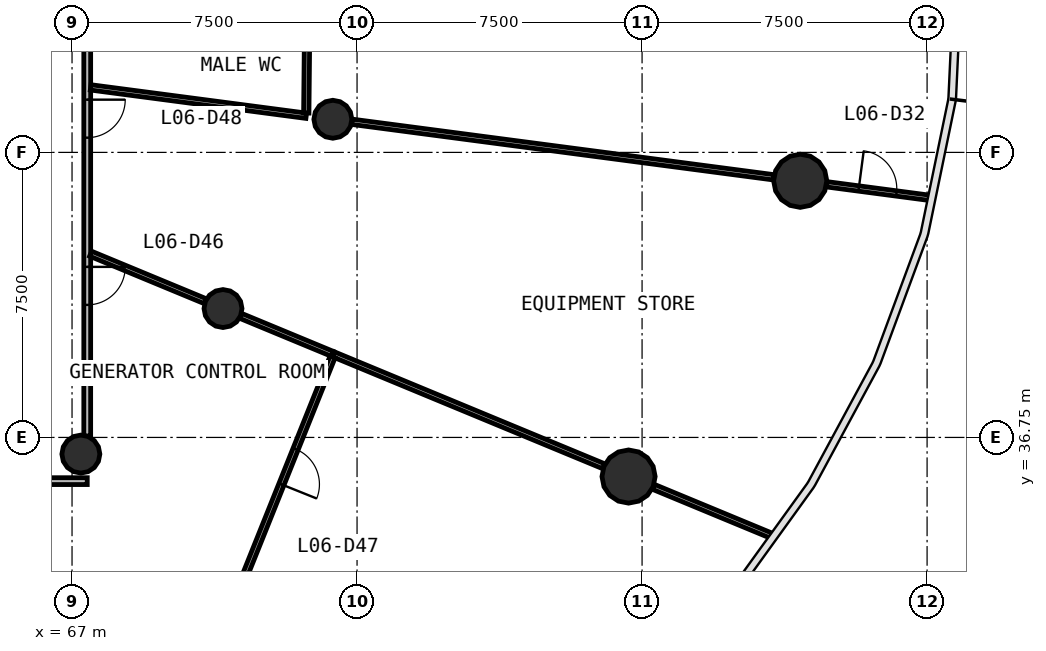
"""IFC4 building model, lengths in metres.
Left out: names, types, materials, properties, quantities, classifications, styles, units other than length and angle.
Written with IfcOpenShell. Run it as: python <this file> out.ifc"""

import sys

from ifc_helpers import new_model, si_unit, direction, frame, frame_2d, origin, origin_2d, place, context, subcontext, project, spatial, rectangle, circle, extrude, source, transform, mapped, element, fill, save


model = new_model("IFC4")
c1 = context("Model", 3, precision=1e-05, world=origin(), true_north=direction((0.0, 1.0)))
c2 = subcontext(c1, "Body", "Model", "MODEL_VIEW")
j1 = project(units=[si_unit("LENGTHUNIT", "METRE"), si_unit("PLANEANGLEUNIT", "RADIAN")], contexts=[c1])
p1 = place(None, origin())
s1 = spatial("IfcSite", under=j1, at=p1, CompositionType="ELEMENT")
p2 = place(p1, origin())
s2 = spatial("IfcBuilding", under=s1, at=p2, CompositionType="ELEMENT")
p3 = place(p2, frame((0.0, 0.0, 27.0)))
s3 = spatial("IfcBuildingStorey", under=s2, at=p3, CompositionType="ELEMENT", Elevation=27.0)
m1 = source(origin(), c2, "Body", "SweptSolid", [
    extrude(circle(Radius=0.7, at=origin_2d()), origin(), (0.0, 0.0, 1.0), 4.4),
])
for number, where, z_axis, x_axis in (
    (1, (81.645, 35.721, 0.0), (0.0, 0.0, 1.0), (1.0, 0.0, 0.0)),
    (2, (86.161, 43.503, 0.0), (0.0, 0.0, 1.0), (1.0, 0.0, 0.0)),
):
    element("IfcColumn", number, at=place(p3, frame(where, z_axis=z_axis, x_axis=x_axis)), inside=s3, PredefinedType="COLUMN", context=c2, shape_type="MappedRepresentation", body=[
        mapped(m1, transform((0.0, 0.0, 0.0), scale=1.0)),
    ])
m2 = source(origin(), c2, "Body", "SweptSolid", [
    extrude(circle(Radius=0.5, at=origin_2d()), origin(), (0.0, 0.0, 1.0), 4.4),
])
for number, where, z_axis, x_axis in (
    (3, (67.232, 36.312, 0.0), (0.0, 0.0, 1.0), (1.0, 0.0, 0.0)),
    (4, (70.972, 40.141, 0.0), (0.0, 0.0, 1.0), (1.0, 0.0, 0.0)),
    (5, (73.863, 45.122, 0.0), (0.0, 0.0, 1.0), (1.0, 0.0, 0.0)),
):
    element("IfcColumn", number, at=place(p3, frame(where, z_axis=z_axis, x_axis=x_axis)), inside=s3, PredefinedType="COLUMN", context=c2, shape_type="MappedRepresentation", body=[
        mapped(m2, transform((0.0, 0.0, 0.0), scale=1.0)),
    ])
p4 = place(p3, frame((67.4, 35.6, 0.0), z_axis=(0.0, 0.0, 1.0), x_axis=(-1.0, 0.0, 0.0)))
e6 = element("IfcWall", 6, at=p4, inside=s3, PredefinedType="PARTITIONING", context=c2, shape_type="SweptSolid", body=[
    extrude(rectangle(XDim=30.8, YDim=0.18, at=frame_2d((15.4, 0.0))), origin(), (0.0, 0.0, 1.0), 3.05),
])
p5 = place(p4, frame((17.35, 0.0, 0.0)))
e7 = element("IfcOpeningElement", 7, at=p5, cuts=e6, PredefinedType="OPENING", context=c2, shape_type="SweptSolid", body=[
    extrude(rectangle(XDim=1.0, YDim=2.1, at=frame_2d((0.5, 1.05))), frame((0.0, 0.1, 0.0), z_axis=(0.0, -1.0, 0.0), x_axis=(1.0, 0.0, 0.0)), (0.0, 0.0, 1.0), 0.2),
])
p6 = place(p4, frame((14.95, 0.0, 0.0)))
e8 = element("IfcOpeningElement", 8, at=p6, cuts=e6, PredefinedType="OPENING", context=c2, shape_type="SweptSolid", body=[
    extrude(rectangle(XDim=1.0, YDim=2.1, at=frame_2d((0.5, 1.05))), frame((0.0, 0.1, 0.0), z_axis=(0.0, -1.0, 0.0), x_axis=(1.0, 0.0, 0.0)), (0.0, 0.0, 1.0), 0.2),
])
p7 = place(p3, frame((67.4, 60.37, 0.0), z_axis=(0.0, 0.0, 1.0), x_axis=(0.0, -1.0, 0.0)))
e9 = element("IfcWall", 9, at=p7, inside=s3, PredefinedType="PARTITIONING", context=c2, shape_type="SweptSolid", body=[
    extrude(rectangle(XDim=23.583, YDim=0.18, at=frame_2d((11.791, 0.0))), origin(), (0.0, 0.0, 1.0), 3.05),
])
p8 = place(p7, frame((11.833, 0.0, 0.0)))
e10 = element("IfcOpeningElement", 10, at=p8, cuts=e9, PredefinedType="OPENING", context=c2, shape_type="SweptSolid", body=[
    extrude(rectangle(XDim=0.9, YDim=2.1, at=frame_2d((0.45, 1.05))), frame((0.0, 0.1, 0.0), z_axis=(0.0, -1.0, 0.0), x_axis=(1.0, 0.0, 0.0)), (0.0, 0.0, 1.0), 0.2),
])
p9 = place(p7, frame((10.433, 0.0, 0.0)))
e11 = element("IfcOpeningElement", 11, at=p9, cuts=e9, PredefinedType="OPENING", context=c2, shape_type="SweptSolid", body=[
    extrude(rectangle(XDim=0.9, YDim=2.1, at=frame_2d((0.45, 1.05))), frame((0.0, 0.1, 0.0), z_axis=(0.0, -1.0, 0.0), x_axis=(1.0, 0.0, 0.0)), (0.0, 0.0, 1.0), 0.2),
])
p10 = place(p7, frame((7.833, 0.0, 0.0)))
e12 = element("IfcOpeningElement", 12, at=p10, cuts=e9, PredefinedType="OPENING", context=c2, shape_type="SweptSolid", body=[
    extrude(rectangle(XDim=0.9, YDim=2.1, at=frame_2d((0.45, 1.05))), frame((0.0, 0.1, 0.0), z_axis=(0.0, -1.0, 0.0), x_axis=(1.0, 0.0, 0.0)), (0.0, 0.0, 1.0), 0.2),
])
p11 = place(p7, frame((19.133, 0.0, 0.0)))
e13 = element("IfcOpeningElement", 13, at=p11, cuts=e9, PredefinedType="OPENING", context=c2, shape_type="SweptSolid", body=[
    extrude(rectangle(XDim=1.0, YDim=2.1, at=frame_2d((0.5, 1.05))), frame((0.0, 0.1, 0.0), z_axis=(0.0, -1.0, 0.0), x_axis=(1.0, 0.0, 0.0)), (0.0, 0.0, 1.0), 0.2),
])
p12 = place(p7, frame((14.732, 0.0, 0.0)))
e14 = element("IfcOpeningElement", 14, at=p12, cuts=e9, PredefinedType="OPENING", context=c2, shape_type="SweptSolid", body=[
    extrude(rectangle(XDim=1.0, YDim=2.1, at=frame_2d((0.5, 1.05))), frame((0.0, 0.1, 0.0), z_axis=(0.0, -1.0, 0.0), x_axis=(1.0, 0.0, 0.0)), (0.0, 0.0, 1.0), 0.2),
])
p13 = place(p3, frame((74.363, 45.056, 0.0), z_axis=(0.0, 0.0, 1.0), x_axis=(0.991443306772, -0.130538000051, 0.0)))
e15 = element("IfcWall", 15, at=p13, inside=s3, PredefinedType="PARTITIONING", context=c2, shape_type="SweptSolid", body=[
    extrude(rectangle(XDim=11.195, YDim=0.14, at=frame_2d((5.598, 0.0))), origin(), (0.0, 0.0, 1.0), 3.05),
])
p14 = place(p3, frame((73.883, 38.936, 0.0), z_axis=(0.0, 0.0, 1.0), x_axis=(0.923874550421, -0.382695459974, 0.0)))
e16 = element("IfcWall", 16, at=p14, inside=s3, PredefinedType="PARTITIONING", context=c2, shape_type="SweptSolid", body=[
    extrude(rectangle(XDim=7.696, YDim=0.14, at=frame_2d((3.848, 0.0))), origin(), (0.0, 0.0, 1.0), 3.05),
])
p15 = place(p3, frame((73.857, 38.871, 0.0), z_axis=(0.0, 0.0, 1.0), x_axis=(-0.372364534272, -0.928086555024, 0.0)))
e17 = element("IfcWall", 17, at=p15, inside=s3, PredefinedType="PARTITIONING", context=c2, shape_type="SweptSolid", body=[
    extrude(rectangle(XDim=6.266, YDim=0.14, at=frame_2d((3.133, 0.0))), origin(), (0.0, 0.0, 1.0), 3.05),
])
p16 = place(p15, frame((2.616, 0.0, 0.0)))
e18 = element("IfcOpeningElement", 18, at=p16, cuts=e17, PredefinedType="OPENING", context=c2, shape_type="SweptSolid", body=[
    extrude(rectangle(XDim=1.0, YDim=2.1, at=frame_2d((0.5, 1.05))), frame((0.0, 0.08, 0.0), z_axis=(0.0, -1.0, 0.0), x_axis=(1.0, 0.0, 0.0)), (0.0, 0.0, 1.0), 0.16),
])
p17 = place(p3, frame((67.49, 45.961, 0.0), z_axis=(0.0, 0.0, 1.0), x_axis=(0.991446015801, -0.130517423176, 0.0)))
e19 = element("IfcWall", 19, at=p17, inside=s3, PredefinedType="PARTITIONING", context=c2, shape_type="SweptSolid", body=[
    extrude(rectangle(XDim=5.722, YDim=0.14, at=frame_2d((2.861, 0.0))), origin(), (0.0, 0.0, 1.0), 3.05),
])
p18 = place(p3, frame((73.164, 45.284, 0.0), z_axis=(0.0, 0.0, 1.0), x_axis=(0.01027995485, 0.999947159868, 0.0)))
e20 = element("IfcWall", 20, at=p18, inside=s3, PredefinedType="PARTITIONING", context=c2, shape_type="SweptSolid", body=[
    extrude(rectangle(XDim=5.51, YDim=0.14, at=frame_2d((2.755, 0.0))), origin(), (0.0, 0.0, 1.0), 3.05),
])
p19 = place(p3, frame((82.296, 35.451, 0.0), z_axis=(0.0, 0.0, 1.0), x_axis=(0.923894038604, -0.382648409681, 0.0)))
e21 = element("IfcWall", 21, at=p19, inside=s3, PredefinedType="PARTITIONING", context=c2, shape_type="SweptSolid", body=[
    extrude(rectangle(XDim=3.368, YDim=0.14, at=frame_2d((1.684, 0.0))), origin(), (0.0, 0.0, 1.0), 3.05),
])
p20 = place(p3, frame((67.49, 41.584, 0.0), z_axis=(0.0, 0.0, 1.0), x_axis=(0.923911109142, -0.382607190737, 0.0)))
e22 = element("IfcWall", 22, at=p20, inside=s3, PredefinedType="PARTITIONING", context=c2, shape_type="SweptSolid", body=[
    extrude(rectangle(XDim=3.264, YDim=0.14, at=frame_2d((1.632, 0.0))), origin(), (0.0, 0.0, 1.0), 3.05),
])
p21 = place(p3, frame((86.859, 43.411, 0.0), z_axis=(0.0, 0.0, 1.0), x_axis=(0.991449119506, -0.130493844417, 0.0)))
e23 = element("IfcWall", 23, at=p21, inside=s3, PredefinedType="PARTITIONING", context=c2, shape_type="SweptSolid", body=[
    extrude(rectangle(XDim=2.73, YDim=0.14, at=frame_2d((1.365, 0.0))), origin(), (0.0, 0.0, 1.0), 3.05),
])
p22 = place(p21, frame((0.85, 0.0, 0.0)))
e24 = element("IfcOpeningElement", 24, at=p22, cuts=e23, PredefinedType="OPENING", context=c2, shape_type="SweptSolid", body=[
    extrude(rectangle(XDim=1.0, YDim=2.1, at=frame_2d((0.5, 1.05))), frame((0.0, 0.08, 0.0), z_axis=(0.0, -1.0, 0.0), x_axis=(1.0, 0.0, 0.0)), (0.0, 0.0, 1.0), 0.16),
])
p23 = place(p3, frame((71.439, 39.948, 0.0), z_axis=(0.0, 0.0, 1.0), x_axis=(0.923867754, -0.382711866968, 0.0)))
e25 = element("IfcWall", 25, at=p23, inside=s3, PredefinedType="PARTITIONING", context=c2, shape_type="SweptSolid", body=[
    extrude(rectangle(XDim=2.615, YDim=0.14, at=frame_2d((1.307, 0.0))), origin(), (0.0, 0.0, 1.0), 3.05),
])
m3 = source(origin(), c2, "Body", "SweptSolid", [
    extrude(rectangle(XDim=1.0, YDim=2.1, at=frame_2d((0.5, 1.05))), frame((0.0, 0.025, 0.0), z_axis=(0.0, -1.0, 0.0), x_axis=(1.0, 0.0, 0.0)), (0.0, 0.0, 1.0), 0.05),
])
p24 = place(p22, origin())
e26 = element("IfcDoor", 26, at=p24, inside=s3, OperationType="SINGLE_SWING_LEFT", PredefinedType="DOOR", context=c2, shape_type="MappedRepresentation", body=[
    mapped(m3, transform((0.0, 0.0, 0.0), scale=1.0)),
])
fill(e24, e26)
p25 = place(p11, origin())
e27 = element("IfcDoor", 27, at=p25, inside=s3, OperationType="SINGLE_SWING_LEFT", PredefinedType="DOOR", context=c2, shape_type="MappedRepresentation", body=[
    mapped(m3, transform((0.0, 0.0, 0.0), scale=1.0)),
])
fill(e13, e27)
p26 = place(p16, origin())
e28 = element("IfcDoor", 28, at=p26, inside=s3, OperationType="SINGLE_SWING_RIGHT", PredefinedType="DOOR", context=c2, shape_type="MappedRepresentation", body=[
    mapped(m3, transform((0.0, 0.0, 0.0), scale=1.0)),
])
fill(e18, e28)
p27 = place(p12, origin())
e29 = element("IfcDoor", 29, at=p27, inside=s3, OperationType="SINGLE_SWING_LEFT", PredefinedType="DOOR", context=c2, shape_type="MappedRepresentation", body=[
    mapped(m3, transform((0.0, 0.0, 0.0), scale=1.0)),
])
fill(e14, e29)
save(model, sys.argv[1])
